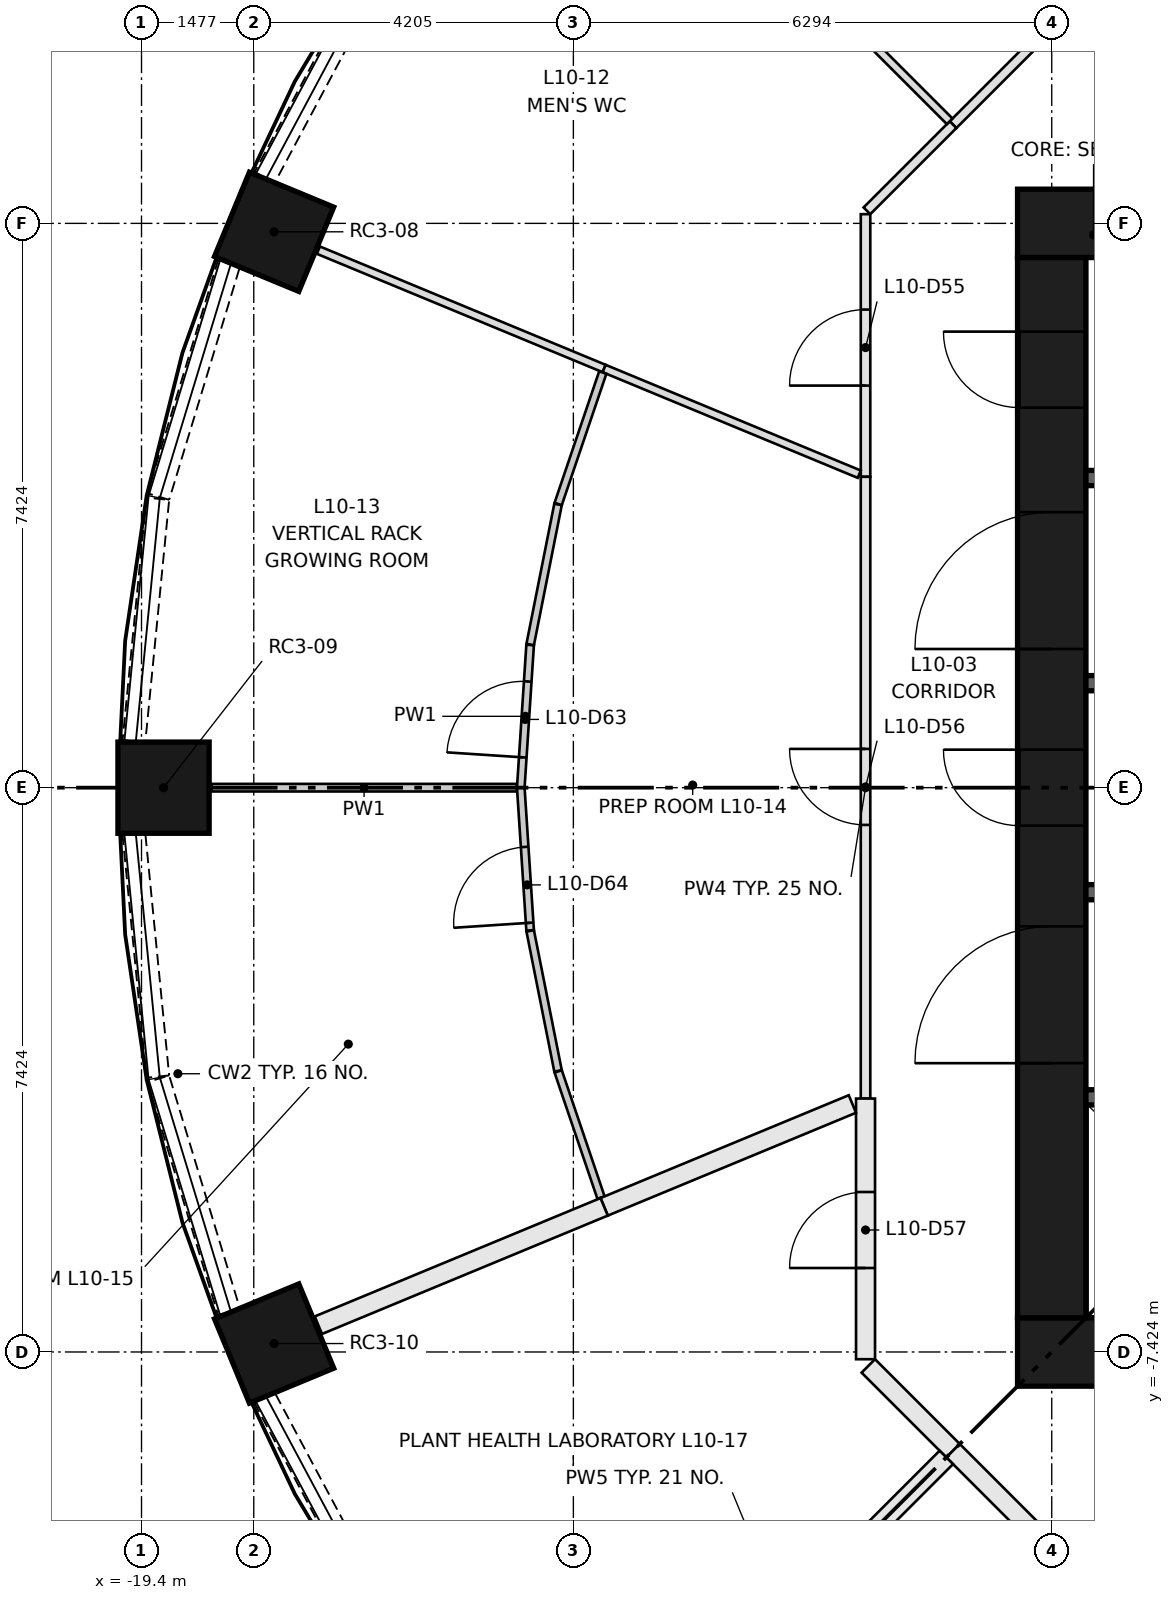
"""IFC4 building model, lengths in metres.
Left out: names, types, materials, properties, quantities, classifications, styles, units other than length and angle.
Written with IfcOpenShell. Run it as: python <this file> out.ifc"""

import sys

from ifc_helpers import new_model, si_unit, direction, frame, frame_2d, origin, origin_2d, place, context, subcontext, project, spatial, rectangle, extrude, element, fill, save


model = new_model("IFC4")
c1 = context("Model", 3, precision=1e-05, world=origin(), true_north=direction((0.0, 1.0)))
c2 = subcontext(c1, "Body", "Model", "MODEL_VIEW")
j1 = project(units=[si_unit("LENGTHUNIT", "METRE"), si_unit("PLANEANGLEUNIT", "RADIAN")], contexts=[c1])
p1 = place(None, origin())
s1 = spatial("IfcSite", under=j1, at=p1, CompositionType="ELEMENT")
p2 = place(p1, origin())
s2 = spatial("IfcBuilding", under=s1, at=p2, CompositionType="ELEMENT")
p3 = place(p2, frame((0.0, 0.0, 40.8)))
s3 = spatial("IfcBuildingStorey", under=s2, at=p3, CompositionType="ELEMENT", Elevation=40.8)
for number, where, z_axis, x_axis in (
    (1, (-17.655, 7.313, 0.0), (0.0, 0.0, 1.0), (-0.924, 0.383, 0.0)),
    (2, (-19.11, 0.0, 0.0), (0.0, 0.0, 1.0), (-1.0, 0.0, 0.0)),
    (3, (-17.655, -7.313, 0.0), (0.0, 0.0, 1.0), (-0.924, -0.383, 0.0)),
):
    element("IfcColumn", number, at=place(p3, frame(where, z_axis=z_axis, x_axis=x_axis)), inside=s3, PredefinedType="COLUMN", context=c2, shape_type="SweptSolid", body=[
        extrude(rectangle(XDim=1.2, YDim=1.2, at=origin_2d()), origin(), (0.0, 0.0, 1.0), 3.65),
    ])
for number, where, z_axis, x_axis in (
    (4, (-7.874, -7.424, 0.0), (0.0, 0.0, 1.0), (1.0, 0.0, 0.0)),
    (5, (-7.874, 7.424, 0.0), (0.0, 0.0, 1.0), (1.0, 0.0, 0.0)),
):
    element("IfcWall", number, at=place(p3, frame(where, z_axis=z_axis, x_axis=x_axis)), inside=s3, PredefinedType="SHEAR", context=c2, shape_type="SweptSolid", body=[
        extrude(rectangle(XDim=15.748, YDim=0.9, at=frame_2d((7.874, 0.0))), origin(), (0.0, 0.0, 1.0), 3.65),
    ])
p4 = place(p3, frame((-7.424, -6.974, 0.0), z_axis=(0.0, 0.0, 1.0), x_axis=(0.0, 1.0, 0.0)))
e6 = element("IfcWall", 6, at=p4, inside=s3, PredefinedType="SHEAR", context=c2, shape_type="SweptSolid", body=[
    extrude(rectangle(XDim=13.948, YDim=0.9, at=frame_2d((6.974, 0.0))), origin(), (0.0, 0.0, 1.0), 3.65),
])
p5 = place(p4, frame((6.474, 0.0, 0.0)))
e7 = element("IfcOpeningElement", 7, at=p5, cuts=e6, PredefinedType="OPENING", context=c2, shape_type="SweptSolid", body=[
    extrude(rectangle(XDim=1.0, YDim=2.1, at=frame_2d((0.5, 1.05))), frame((0.0, 0.46, 0.0), z_axis=(0.0, -1.0, 0.0), x_axis=(1.0, 0.0, 0.0)), (0.0, 0.0, 1.0), 0.92),
])
p6 = place(p4, frame((3.35, 0.0, 0.0)))
e8 = element("IfcOpeningElement", 8, at=p6, cuts=e6, PredefinedType="OPENING", context=c2, shape_type="SweptSolid", body=[
    extrude(rectangle(XDim=1.8, YDim=2.1, at=frame_2d((0.9, 1.05))), frame((0.0, 0.46, 0.0), z_axis=(0.0, -1.0, 0.0), x_axis=(1.0, 0.0, 0.0)), (0.0, 0.0, 1.0), 0.92),
])
p7 = place(p4, frame((8.799, 0.0, 0.0)))
e9 = element("IfcOpeningElement", 9, at=p7, cuts=e6, PredefinedType="OPENING", context=c2, shape_type="SweptSolid", body=[
    extrude(rectangle(XDim=1.8, YDim=2.1, at=frame_2d((0.9, 1.05))), frame((0.0, 0.46, 0.0), z_axis=(0.0, -1.0, 0.0), x_axis=(1.0, 0.0, 0.0)), (0.0, 0.0, 1.0), 0.92),
])
p8 = place(p4, frame((11.974, 0.0, 0.0)))
e10 = element("IfcOpeningElement", 10, at=p8, cuts=e6, PredefinedType="OPENING", context=c2, shape_type="SweptSolid", body=[
    extrude(rectangle(XDim=1.0, YDim=2.1, at=frame_2d((0.5, 1.05))), frame((0.0, 0.46, 0.0), z_axis=(0.0, -1.0, 0.0), x_axis=(1.0, 0.0, 0.0)), (0.0, 0.0, 1.0), 0.92),
])
p9 = place(p3, frame((-6.974, -4.074, 0.0), z_axis=(0.0, 0.0, 1.0), x_axis=(1.0, 0.0, 0.0)))
e11 = element("IfcWall", 11, at=p9, inside=s3, PredefinedType="SHEAR", context=c2, shape_type="SweptSolid", body=[
    extrude(rectangle(XDim=13.948, YDim=0.2, at=frame_2d((6.974, 0.0))), origin(), (0.0, 0.0, 1.0), 3.3),
])
p10 = place(p9, frame((0.918, 0.0, 0.0)))
e12 = element("IfcOpeningElement", 12, at=p10, cuts=e11, PredefinedType="OPENING", context=c2, shape_type="SweptSolid", body=[
    extrude(rectangle(XDim=1.1, YDim=2.1, at=frame_2d((0.55, 1.05))), frame((0.0, 0.11, 0.0), z_axis=(0.0, -1.0, 0.0), x_axis=(1.0, 0.0, 0.0)), (0.0, 0.0, 1.0), 0.22),
])
p11 = place(p9, frame((4.055, 0.0, 0.0)))
e13 = element("IfcOpeningElement", 13, at=p11, cuts=e11, PredefinedType="OPENING", context=c2, shape_type="SweptSolid", body=[
    extrude(rectangle(XDim=1.1, YDim=2.1, at=frame_2d((0.55, 1.05))), frame((0.0, 0.11, 0.0), z_axis=(0.0, -1.0, 0.0), x_axis=(1.0, 0.0, 0.0)), (0.0, 0.0, 1.0), 0.22),
])
p12 = place(p9, frame((6.658, 0.0, 0.0)))
e14 = element("IfcOpeningElement", 14, at=p12, cuts=e11, PredefinedType="OPENING", context=c2, shape_type="SweptSolid", body=[
    extrude(rectangle(XDim=1.0, YDim=2.1, at=frame_2d((0.5, 1.05))), frame((0.0, 0.11, 0.0), z_axis=(0.0, -1.0, 0.0), x_axis=(1.0, 0.0, 0.0)), (0.0, 0.0, 1.0), 0.22),
])
p13 = place(p9, frame((8.627, 0.0, 0.0)))
e15 = element("IfcOpeningElement", 15, at=p13, cuts=e11, PredefinedType="OPENING", context=c2, shape_type="SweptSolid", body=[
    extrude(rectangle(XDim=1.0, YDim=2.1, at=frame_2d((0.5, 1.05))), frame((0.0, 0.11, 0.0), z_axis=(0.0, -1.0, 0.0), x_axis=(1.0, 0.0, 0.0)), (0.0, 0.0, 1.0), 0.22),
])
p14 = place(p9, frame((10.595, 0.0, 0.0)))
e16 = element("IfcOpeningElement", 16, at=p14, cuts=e11, PredefinedType="OPENING", context=c2, shape_type="SweptSolid", body=[
    extrude(rectangle(XDim=1.0, YDim=2.1, at=frame_2d((0.5, 1.05))), frame((0.0, 0.11, 0.0), z_axis=(0.0, -1.0, 0.0), x_axis=(1.0, 0.0, 0.0)), (0.0, 0.0, 1.0), 0.22),
])
p15 = place(p9, frame((12.564, 0.0, 0.0)))
e17 = element("IfcOpeningElement", 17, at=p15, cuts=e11, PredefinedType="OPENING", context=c2, shape_type="SweptSolid", body=[
    extrude(rectangle(XDim=1.0, YDim=2.1, at=frame_2d((0.5, 1.05))), frame((0.0, 0.11, 0.0), z_axis=(0.0, -1.0, 0.0), x_axis=(1.0, 0.0, 0.0)), (0.0, 0.0, 1.0), 0.22),
])
p16 = place(p3, frame((-6.974, 4.074, 0.0), z_axis=(0.0, 0.0, 1.0), x_axis=(1.0, 0.0, 0.0)))
e18 = element("IfcWall", 18, at=p16, inside=s3, PredefinedType="SHEAR", context=c2, shape_type="SweptSolid", body=[
    extrude(rectangle(XDim=6.974, YDim=0.2, at=frame_2d((3.487, 0.0))), origin(), (0.0, 0.0, 1.0), 3.3),
])
for number, where, z_axis, x_axis in (
    (19, (-6.974, -1.375, 0.0), (0.0, 0.0, 1.0), (1.0, 0.0, 0.0)),
    (20, (-6.974, 1.375, 0.0), (0.0, 0.0, 1.0), (1.0, 0.0, 0.0)),
):
    element("IfcWall", number, at=place(p3, frame(where, z_axis=z_axis, x_axis=x_axis)), inside=s3, PredefinedType="SHEAR", context=c2, shape_type="SweptSolid", body=[
        extrude(rectangle(XDim=2.6, YDim=0.2, at=frame_2d((1.3, 0.0))), origin(), (0.0, 0.0, 1.0), 3.3),
    ])
p17 = place(p3, frame((-16.27, 10.854, 0.0), z_axis=(0.0, 0.0, 1.0), x_axis=(-0.471284265614, -0.881981372243, 0.0)))
e21 = element("IfcWall", 21, at=p17, inside=s3, PredefinedType="SOLIDWALL", context=c2, shape_type="SweptSolid", body=[
    extrude(rectangle(XDim=3.204, YDim=0.3, at=frame_2d((1.602, 0.0))), origin(), (0.0, 0.0, 1.0), 0.9),
])
p18 = place(p3, frame((-18.25, 6.895, 0.0), z_axis=(0.0, 0.0, 1.0), x_axis=(-0.290472877795, -0.956883225512, 0.0)))
e22 = element("IfcWall", 22, at=p18, inside=s3, PredefinedType="SOLIDWALL", context=c2, shape_type="SweptSolid", body=[
    extrude(rectangle(XDim=3.202, YDim=0.3, at=frame_2d((1.601, 0.0))), origin(), (0.0, 0.0, 1.0), 0.9),
])
for number, where, z_axis, x_axis in (
    (23, (-19.186, 3.801, 0.0), (0.0, 0.0, 1.0), (-0.098, -0.995, 0.0)),
    (24, (-19.5, -0.613, 0.0), (0.0, 0.0, 1.0), (0.098, -0.995, 0.0)),
):
    element("IfcWall", number, at=place(p3, frame(where, z_axis=z_axis, x_axis=x_axis)), inside=s3, PredefinedType="SOLIDWALL", context=c2, shape_type="SweptSolid", body=[
        extrude(rectangle(XDim=3.204, YDim=0.3, at=frame_2d((1.602, 0.0))), origin(), (0.0, 0.0, 1.0), 0.9),
    ])
p19 = place(p3, frame((-19.18, -3.83, 0.0), z_axis=(0.0, 0.0, 1.0), x_axis=(0.290472877795, -0.956883225512, 0.0)))
e25 = element("IfcWall", 25, at=p19, inside=s3, PredefinedType="SOLIDWALL", context=c2, shape_type="SweptSolid", body=[
    extrude(rectangle(XDim=3.202, YDim=0.3, at=frame_2d((1.601, 0.0))), origin(), (0.0, 0.0, 1.0), 0.9),
])
p20 = place(p3, frame((-17.78, -8.028, 0.0), z_axis=(0.0, 0.0, 1.0), x_axis=(0.471284265614, -0.881981372243, 0.0)))
e26 = element("IfcWall", 26, at=p20, inside=s3, PredefinedType="SOLIDWALL", context=c2, shape_type="SweptSolid", body=[
    extrude(rectangle(XDim=3.204, YDim=0.3, at=frame_2d((1.602, 0.0))), origin(), (0.0, 0.0, 1.0), 0.9),
])
p21 = place(p3, frame((-8.722, 8.722, 0.0), z_axis=(0.0, 0.0, 1.0), x_axis=(0.707030604857, 0.70718294931, 0.0)))
e27 = element("IfcWall", 27, at=p21, inside=s3, PredefinedType="PARTITIONING", context=c2, shape_type="SweptSolid", body=[
    extrude(rectangle(XDim=1.603, YDim=0.125, at=frame_2d((0.801, 0.0))), origin(), (0.0, 0.0, 1.0), 3.3),
])
p22 = place(p3, frame((-9.874, 4.09, 0.0), z_axis=(0.0, 0.0, 1.0), x_axis=(0.0, 1.0, 0.0)))
e28 = element("IfcWall", 28, at=p22, inside=s3, PredefinedType="PARTITIONING", context=c2, shape_type="SweptSolid", body=[
    extrude(rectangle(XDim=3.455, YDim=0.125, at=frame_2d((1.728, 0.0))), origin(), (0.0, 0.0, 1.0), 3.3),
])
p23 = place(p22, frame((1.2, 0.0, 0.0)))
e29 = element("IfcOpeningElement", 29, at=p23, cuts=e28, PredefinedType="OPENING", context=c2, shape_type="SweptSolid", body=[
    extrude(rectangle(XDim=1.0, YDim=2.1, at=frame_2d((0.5, 1.05))), frame((0.0, 0.073, 0.0), z_axis=(0.0, -1.0, 0.0), x_axis=(1.0, 0.0, 0.0)), (0.0, 0.0, 1.0), 0.145),
])
p24 = place(p3, frame((-9.856, 7.589, 0.0), z_axis=(0.0, 0.0, 1.0), x_axis=(0.70718294931, 0.707030604857, 0.0)))
e30 = element("IfcWall", 30, at=p24, inside=s3, PredefinedType="PARTITIONING", context=c2, shape_type="SweptSolid", body=[
    extrude(rectangle(XDim=1.603, YDim=0.125, at=frame_2d((0.801, 0.0))), origin(), (0.0, 0.0, 1.0), 3.3),
])
p25 = place(p3, frame((-9.874, -4.09, 0.0), z_axis=(0.0, 0.0, 1.0), x_axis=(0.0, 1.0, 0.0)))
e31 = element("IfcWall", 31, at=p25, inside=s3, PredefinedType="PARTITIONING", context=c2, shape_type="SweptSolid", body=[
    extrude(rectangle(XDim=8.18, YDim=0.125, at=frame_2d((4.09, 0.0))), origin(), (0.0, 0.0, 1.0), 3.3),
])
p26 = place(p25, frame((3.6, 0.0, 0.0)))
e32 = element("IfcOpeningElement", 32, at=p26, cuts=e31, PredefinedType="OPENING", context=c2, shape_type="SweptSolid", body=[
    extrude(rectangle(XDim=1.0, YDim=2.1, at=frame_2d((0.5, 1.05))), frame((0.0, 0.073, 0.0), z_axis=(0.0, -1.0, 0.0), x_axis=(1.0, 0.0, 0.0)), (0.0, 0.0, 1.0), 0.145),
])
p27 = place(p3, frame((-9.874, -7.519, 0.0), z_axis=(0.0, 0.0, 1.0), x_axis=(0.0, 1.0, 0.0)))
e33 = element("IfcWall", 33, at=p27, inside=s3, PredefinedType="PARTITIONING", context=c2, shape_type="SweptSolid", body=[
    extrude(rectangle(XDim=3.429, YDim=0.25, at=frame_2d((1.715, 0.0))), origin(), (0.0, 0.0, 1.0), 3.3),
])
p28 = place(p27, frame((1.2, 0.0, 0.0)))
e34 = element("IfcOpeningElement", 34, at=p28, cuts=e33, PredefinedType="OPENING", context=c2, shape_type="SweptSolid", body=[
    extrude(rectangle(XDim=1.0, YDim=2.1, at=frame_2d((0.5, 1.05))), frame((0.0, 0.135, 0.0), z_axis=(0.0, -1.0, 0.0), x_axis=(1.0, 0.0, 0.0)), (0.0, 0.0, 1.0), 0.27),
])
for number, where, z_axis, x_axis in (
    (35, (-8.722, -8.722, 0.0), (0.0, 0.0, 1.0), (-0.707, 0.707, 0.0)),
    (36, (-7.608, -9.837, 0.0), (0.0, 0.0, 1.0), (-0.707, 0.707, 0.0)),
):
    element("IfcWall", number, at=place(p3, frame(where, z_axis=z_axis, x_axis=x_axis)), inside=s3, PredefinedType="PARTITIONING", context=c2, shape_type="SweptSolid", body=[
        extrude(rectangle(XDim=1.577, YDim=0.25, at=frame_2d((0.788, 0.0))), origin(), (0.0, 0.0, 1.0), 3.3),
    ])
p29 = place(p3, frame((-8.767, 8.767, 0.0), z_axis=(0.0, 0.0, 1.0), x_axis=(-0.707106781187, 0.707106781187, 0.0)))
e37 = element("IfcWall", 37, at=p29, inside=s3, PredefinedType="PARTITIONING", context=c2, shape_type="SweptSolid", body=[
    extrude(rectangle(XDim=6.082, YDim=0.105, at=frame_2d((3.041, 0.0))), origin(), (0.0, 0.0, 1.0), 3.3),
])
p30 = place(p3, frame((-13.313, 5.514, 0.0), z_axis=(0.0, 0.0, 1.0), x_axis=(-0.923873536763, 0.382697907061, 0.0)))
e38 = element("IfcWall", 38, at=p30, inside=s3, PredefinedType="PARTITIONING", context=c2, shape_type="SweptSolid", body=[
    extrude(rectangle(XDim=4.07, YDim=0.105, at=frame_2d((2.035, 0.0))), origin(), (0.0, 0.0, 1.0), 3.3),
])
p31 = place(p3, frame((-9.957, 4.124, 0.0), z_axis=(0.0, 0.0, 1.0), x_axis=(-0.923870220065, 0.382705913825, 0.0)))
e39 = element("IfcWall", 39, at=p31, inside=s3, PredefinedType="PARTITIONING", context=c2, shape_type="SweptSolid", body=[
    extrude(rectangle(XDim=3.633, YDim=0.105, at=frame_2d((1.816, 0.0))), origin(), (0.0, 0.0, 1.0), 3.3),
])
p32 = place(p3, frame((-14.41, 0.0, 0.0), z_axis=(0.0, 0.0, 1.0), x_axis=(0.065390885675, 0.997859725648, 0.0)))
e40 = element("IfcWall", 40, at=p32, inside=s3, PredefinedType="PARTITIONING", context=c2, shape_type="SweptSolid", body=[
    extrude(rectangle(XDim=1.882, YDim=0.1, at=frame_2d((0.941, 0.0))), origin(), (0.0, 0.0, 1.0), 3.3),
])
p33 = place(p32, frame((0.4, 0.0, 0.0)))
e41 = element("IfcOpeningElement", 41, at=p33, cuts=e40, PredefinedType="OPENING", context=c2, shape_type="SweptSolid", body=[
    extrude(rectangle(XDim=1.0, YDim=2.1, at=frame_2d((0.5, 1.05))), frame((0.0, 0.06, 0.0), z_axis=(0.0, -1.0, 0.0), x_axis=(1.0, 0.0, 0.0)), (0.0, 0.0, 1.0), 0.12),
])
p34 = place(p3, frame((-13.92, 3.726, 0.0), z_axis=(0.0, 0.0, 1.0), x_axis=(-0.195091231684, -0.980785099459, 0.0)))
e42 = element("IfcWall", 42, at=p34, inside=s3, PredefinedType="PARTITIONING", context=c2, shape_type="SweptSolid", body=[
    extrude(rectangle(XDim=1.878, YDim=0.1, at=frame_2d((0.939, 0.0))), origin(), (0.0, 0.0, 1.0), 3.3),
])
p35 = place(p3, frame((-13.331, 5.461, 0.0), z_axis=(0.0, 0.0, 1.0), x_axis=(-0.321478362794, -0.946916924685, 0.0)))
e43 = element("IfcWall", 43, at=p35, inside=s3, PredefinedType="PARTITIONING", context=c2, shape_type="SweptSolid", body=[
    extrude(rectangle(XDim=1.826, YDim=0.1, at=frame_2d((0.913, 0.0))), origin(), (0.0, 0.0, 1.0), 3.3),
])
p36 = place(p3, frame((-14.463, 0.0, 0.0), z_axis=(0.0, 0.0, 1.0), x_axis=(-1.0, 0.0, 0.0)))
e44 = element("IfcWall", 44, at=p36, inside=s3, PredefinedType="PARTITIONING", context=c2, shape_type="SweptSolid", body=[
    extrude(rectangle(XDim=4.017, YDim=0.1, at=frame_2d((2.008, 0.0))), origin(), (0.0, 0.0, 1.0), 3.3),
])
p37 = place(p3, frame((-14.287, -1.878, 0.0), z_axis=(0.0, 0.0, 1.0), x_axis=(-0.065390885675, 0.997859725648, 0.0)))
e45 = element("IfcWall", 45, at=p37, inside=s3, PredefinedType="PARTITIONING", context=c2, shape_type="SweptSolid", body=[
    extrude(rectangle(XDim=1.882, YDim=0.1, at=frame_2d((0.941, 0.0))), origin(), (0.0, 0.0, 1.0), 3.3),
])
p38 = place(p37, frame((0.1, 0.0, 0.0)))
e46 = element("IfcOpeningElement", 46, at=p38, cuts=e45, PredefinedType="OPENING", context=c2, shape_type="SweptSolid", body=[
    extrude(rectangle(XDim=1.0, YDim=2.1, at=frame_2d((0.5, 1.05))), frame((0.0, 0.06, 0.0), z_axis=(0.0, -1.0, 0.0), x_axis=(1.0, 0.0, 0.0)), (0.0, 0.0, 1.0), 0.12),
])
p39 = place(p3, frame((-13.92, -3.726, 0.0), z_axis=(0.0, 0.0, 1.0), x_axis=(-0.195091231684, 0.980785099459, 0.0)))
e47 = element("IfcWall", 47, at=p39, inside=s3, PredefinedType="PARTITIONING", context=c2, shape_type="SweptSolid", body=[
    extrude(rectangle(XDim=1.878, YDim=0.1, at=frame_2d((0.939, 0.0))), origin(), (0.0, 0.0, 1.0), 3.3),
])
p40 = place(p3, frame((-13.354, -5.393, 0.0), z_axis=(0.0, 0.0, 1.0), x_axis=(-0.321445771201, 0.946927988908, 0.0)))
e48 = element("IfcWall", 48, at=p40, inside=s3, PredefinedType="PARTITIONING", context=c2, shape_type="SweptSolid", body=[
    extrude(rectangle(XDim=1.753, YDim=0.1, at=frame_2d((0.876, 0.0))), origin(), (0.0, 0.0, 1.0), 3.3),
])
p41 = place(p3, frame((-10.047, -4.162, 0.0), z_axis=(0.0, 0.0, 1.0), x_axis=(-0.92388805455, -0.382662857696, 0.0)))
e49 = element("IfcWall", 49, at=p41, inside=s3, PredefinedType="PARTITIONING", context=c2, shape_type="SweptSolid", body=[
    extrude(rectangle(XDim=3.535, YDim=0.25, at=frame_2d((1.768, 0.0))), origin(), (0.0, 0.0, 1.0), 3.3),
])
p42 = place(p3, frame((-13.313, -5.514, 0.0), z_axis=(0.0, 0.0, 1.0), x_axis=(-0.923873536763, -0.382697907061, 0.0)))
e50 = element("IfcWall", 50, at=p42, inside=s3, PredefinedType="PARTITIONING", context=c2, shape_type="SweptSolid", body=[
    extrude(rectangle(XDim=4.07, YDim=0.25, at=frame_2d((2.035, 0.0))), origin(), (0.0, 0.0, 1.0), 3.3),
])
p43 = place(p3, frame((-13.067, -13.067, 0.0), z_axis=(0.0, 0.0, 1.0), x_axis=(0.707106781187, 0.707106781187, 0.0)))
e51 = element("IfcWall", 51, at=p43, inside=s3, PredefinedType="PARTITIONING", context=c2, shape_type="SweptSolid", body=[
    extrude(rectangle(XDim=6.02, YDim=0.25, at=frame_2d((3.01, 0.0))), origin(), (0.0, 0.0, 1.0), 3.3),
])
p44 = place(p5, origin())
e52 = element("IfcDoor", 52, at=p44, inside=s3, OperationType="SINGLE_SWING_RIGHT", PredefinedType="DOOR", context=c2, shape_type="SweptSolid", body=[
    extrude(rectangle(XDim=1.0, YDim=2.1, at=frame_2d((0.5, 1.05))), frame((0.0, 0.45, 0.0), z_axis=(0.0, -1.0, 0.0), x_axis=(1.0, 0.0, 0.0)), (0.0, 0.0, 1.0), 0.05),
])
fill(e7, e52)
p45 = place(p6, origin())
e53 = element("IfcDoor", 53, at=p45, inside=s3, OperationType="DOUBLE_DOOR_SINGLE_SWING", PredefinedType="DOOR", context=c2, shape_type="SweptSolid", body=[
    extrude(rectangle(XDim=1.8, YDim=2.1, at=frame_2d((0.9, 1.05))), frame((0.0, 0.025, 0.0), z_axis=(0.0, -1.0, 0.0), x_axis=(1.0, 0.0, 0.0)), (0.0, 0.0, 1.0), 0.05),
])
fill(e8, e53)
p46 = place(p7, origin())
e54 = element("IfcDoor", 54, at=p46, inside=s3, OperationType="DOUBLE_DOOR_SINGLE_SWING", PredefinedType="DOOR", context=c2, shape_type="SweptSolid", body=[
    extrude(rectangle(XDim=1.8, YDim=2.1, at=frame_2d((0.9, 1.05))), frame((0.0, 0.025, 0.0), z_axis=(0.0, -1.0, 0.0), x_axis=(1.0, 0.0, 0.0)), (0.0, 0.0, 1.0), 0.05),
])
fill(e9, e54)
p47 = place(p8, origin())
e55 = element("IfcDoor", 55, at=p47, inside=s3, OperationType="SINGLE_SWING_RIGHT", PredefinedType="DOOR", context=c2, shape_type="SweptSolid", body=[
    extrude(rectangle(XDim=1.0, YDim=2.1, at=frame_2d((0.5, 1.05))), frame((0.0, 0.45, 0.0), z_axis=(0.0, -1.0, 0.0), x_axis=(1.0, 0.0, 0.0)), (0.0, 0.0, 1.0), 0.05),
])
fill(e10, e55)
p48 = place(p23, origin())
e56 = element("IfcDoor", 56, at=p48, inside=s3, OperationType="SINGLE_SWING_LEFT", PredefinedType="DOOR", context=c2, shape_type="SweptSolid", body=[
    extrude(rectangle(XDim=1.0, YDim=2.1, at=frame_2d((0.5, 1.05))), frame((0.0, 0.025, 0.0), z_axis=(0.0, -1.0, 0.0), x_axis=(1.0, 0.0, 0.0)), (0.0, 0.0, 1.0), 0.05),
])
fill(e29, e56)
p49 = place(p26, origin())
e57 = element("IfcDoor", 57, at=p49, inside=s3, OperationType="SINGLE_SWING_RIGHT", PredefinedType="DOOR", context=c2, shape_type="SweptSolid", body=[
    extrude(rectangle(XDim=1.0, YDim=2.1, at=frame_2d((0.5, 1.05))), frame((0.0, 0.025, 0.0), z_axis=(0.0, -1.0, 0.0), x_axis=(1.0, 0.0, 0.0)), (0.0, 0.0, 1.0), 0.05),
])
fill(e32, e57)
p50 = place(p28, origin())
e58 = element("IfcDoor", 58, at=p50, inside=s3, OperationType="SINGLE_SWING_LEFT", PredefinedType="DOOR", context=c2, shape_type="SweptSolid", body=[
    extrude(rectangle(XDim=1.0, YDim=2.1, at=frame_2d((0.5, 1.05))), frame((0.0, 0.025, 0.0), z_axis=(0.0, -1.0, 0.0), x_axis=(1.0, 0.0, 0.0)), (0.0, 0.0, 1.0), 0.05),
])
fill(e34, e58)
p51 = place(p33, origin())
e59 = element("IfcDoor", 59, at=p51, inside=s3, OperationType="SINGLE_SWING_LEFT", PredefinedType="DOOR", context=c2, shape_type="SweptSolid", body=[
    extrude(rectangle(XDim=1.0, YDim=2.1, at=frame_2d((0.5, 1.05))), frame((0.0, 0.025, 0.0), z_axis=(0.0, -1.0, 0.0), x_axis=(1.0, 0.0, 0.0)), (0.0, 0.0, 1.0), 0.05),
])
fill(e41, e59)
p52 = place(p38, origin())
e60 = element("IfcDoor", 60, at=p52, inside=s3, OperationType="SINGLE_SWING_LEFT", PredefinedType="DOOR", context=c2, shape_type="SweptSolid", body=[
    extrude(rectangle(XDim=1.0, YDim=2.1, at=frame_2d((0.5, 1.05))), frame((0.0, 0.025, 0.0), z_axis=(0.0, -1.0, 0.0), x_axis=(1.0, 0.0, 0.0)), (0.0, 0.0, 1.0), 0.05),
])
fill(e46, e60)
save(model, sys.argv[1])
